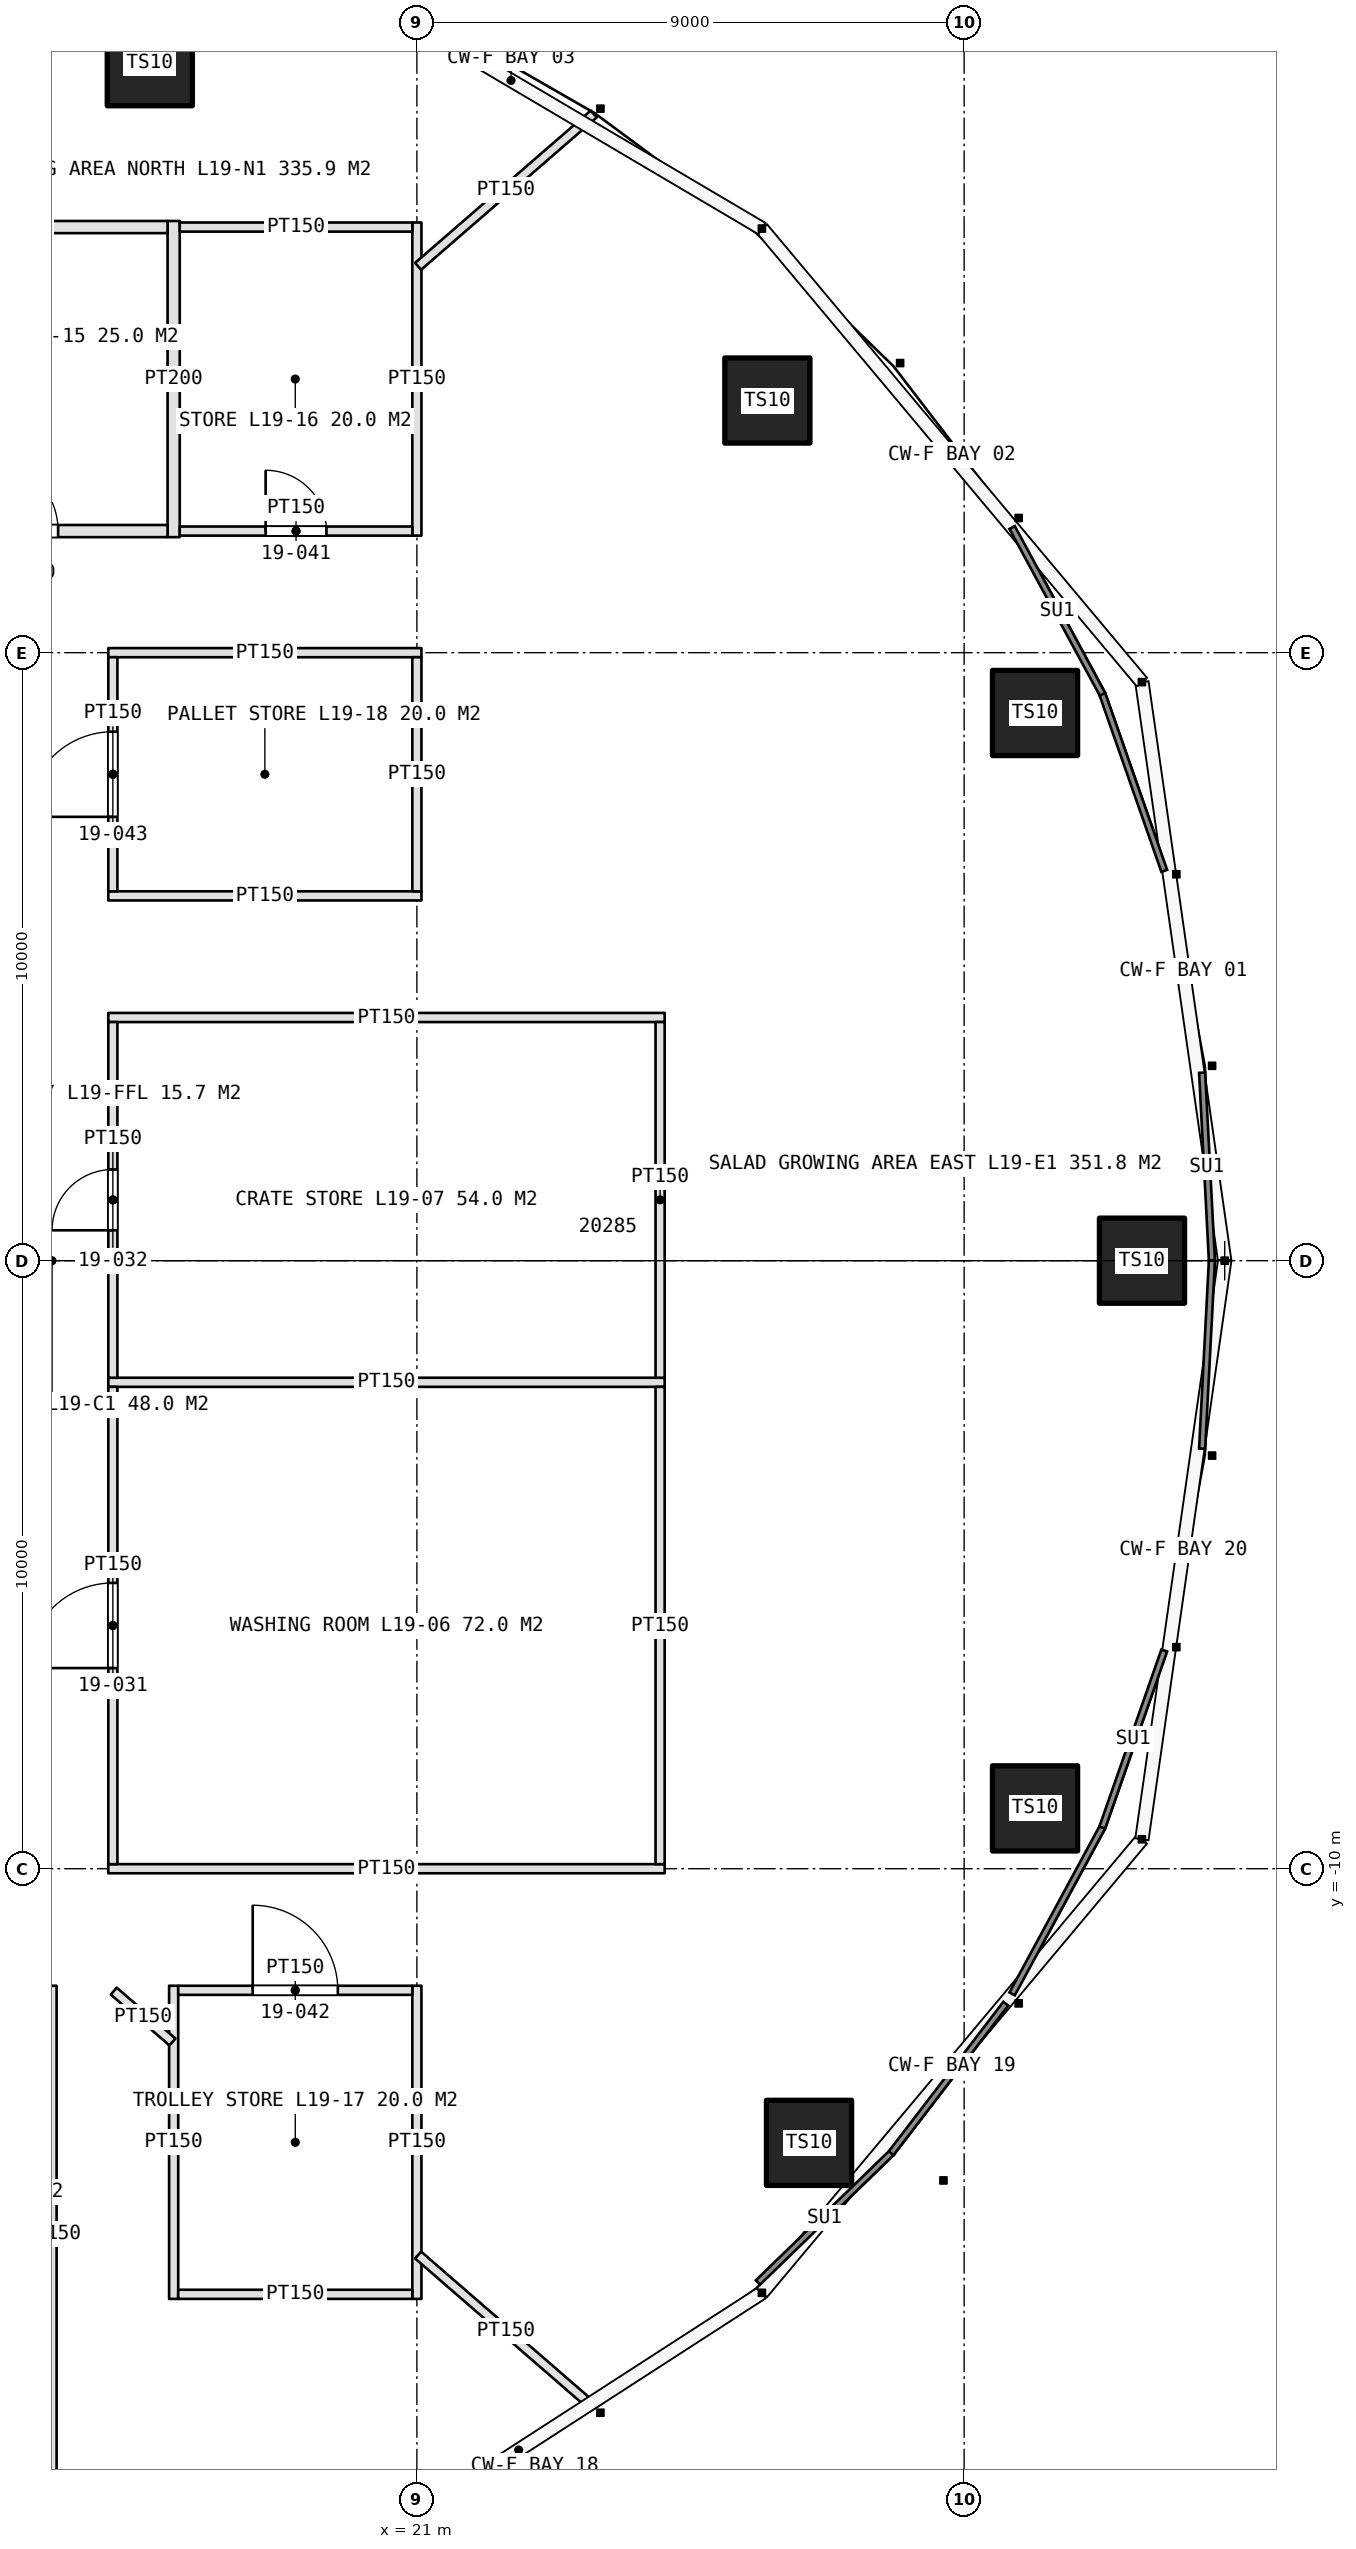
"""IFC4 building model, lengths in metres.
Left out: names, types, materials, properties, quantities, classifications, styles, units other than length and angle.
Written with IfcOpenShell. Run it as: python <this file> out.ifc"""

import sys

from ifc_helpers import new_model, si_unit, direction, frame, frame_2d, origin, origin_2d, place, context, subcontext, project, spatial, rectangle, hollow_rectangle, extrude, element, fill, save


model = new_model("IFC4")
c1 = context("Model", 3, precision=1e-05, world=origin(), true_north=direction((0.0, 1.0)))
c2 = subcontext(c1, "Body", "Model", "MODEL_VIEW")
j1 = project(units=[si_unit("LENGTHUNIT", "METRE"), si_unit("PLANEANGLEUNIT", "RADIAN")], contexts=[c1])
p1 = place(None, origin())
s1 = spatial("IfcSite", under=j1, at=p1, CompositionType="ELEMENT")
p2 = place(p1, origin())
s2 = spatial("IfcBuilding", under=s1, at=p2, CompositionType="ELEMENT")
p3 = place(p2, frame((0.0, 0.0, 95.0)))
s3 = spatial("IfcBuildingStorey", under=s2, at=p3, CompositionType="ELEMENT", Elevation=95.0)
for number, where, z_axis, x_axis in (
    (1, (32.925, 0.0, 0.0), (0.0, 0.0, 1.0), (1.0, 0.0, 0.0)),
    (2, (31.166, 9.008, 0.0), (0.0, 0.0, 1.0), (1.0, 0.0, 0.0)),
):
    element("IfcColumn", number, at=place(p3, frame(where, z_axis=z_axis, x_axis=x_axis)), inside=s3, PredefinedType="COLUMN", context=c2, shape_type="SweptSolid", body=[
        extrude(hollow_rectangle(XDim=1.4, YDim=1.4, WallThickness=0.15, at=origin_2d()), origin(), (0.0, 0.0, 1.0), 4.025),
    ])
for number, where, z_axis, x_axis in (
    (3, (26.764, 14.147, 0.0), (0.0, 0.0, 1.0), (1.0, 0.0, 0.0)),
    (4, (16.608, 19.695, 0.0), (0.0, 0.0, 1.0), (1.0, 0.0, 0.0)),
):
    element("IfcColumn", number, at=place(p3, frame(where, z_axis=z_axis, x_axis=x_axis)), inside=s3, PredefinedType="COLUMN", context=c2, shape_type="SweptSolid", body=[
        extrude(hollow_rectangle(XDim=1.4, YDim=1.4, WallThickness=0.15, at=origin_2d()), origin(), (0.0, 0.0, 1.0), 5.0),
    ])
for number, where, z_axis, x_axis in (
    (5, (27.449, -14.509, 0.0), (0.0, 0.0, 1.0), (1.0, 0.0, 0.0)),
    (6, (31.166, -9.008, 0.0), (0.0, 0.0, 1.0), (1.0, 0.0, 0.0)),
):
    element("IfcColumn", number, at=place(p3, frame(where, z_axis=z_axis, x_axis=x_axis)), inside=s3, PredefinedType="COLUMN", context=c2, shape_type="SweptSolid", body=[
        extrude(hollow_rectangle(XDim=1.4, YDim=1.4, WallThickness=0.15, at=origin_2d()), origin(), (0.0, 0.0, 1.0), 4.025),
    ])
p4 = place(p3, frame((15.0, -11.925, 0.0), z_axis=(0.0, 0.0, 1.0), x_axis=(0.0, -1.0, 0.0)))
e7 = element("IfcWall", 7, at=p4, inside=s3, PredefinedType="PARTITIONING", context=c2, shape_type="SweptSolid", body=[
    extrude(rectangle(XDim=8.15, YDim=0.15, at=frame_2d((4.075, 0.0))), origin(), (0.0, 0.0, 1.0), 3.6),
])
for number, where, z_axis, x_axis in (
    (8, (15.925, -10.0, 0.0), (0.0, 0.0, 1.0), (1.0, 0.0, 0.0)),
    (9, (15.925, -2.0, 0.0), (0.0, 0.0, 1.0), (1.0, 0.0, 0.0)),
    (10, (15.925, 4.0, 0.0), (0.0, 0.0, 1.0), (1.0, 0.0, 0.0)),
):
    element("IfcWall", number, at=place(p3, frame(where, z_axis=z_axis, x_axis=x_axis)), inside=s3, PredefinedType="PARTITIONING", context=c2, shape_type="SweptSolid", body=[
        extrude(rectangle(XDim=9.15, YDim=0.15, at=frame_2d((4.575, 0.0))), origin(), (0.0, 0.0, 1.0), 3.6),
    ])
p5 = place(p3, frame((16.0, -9.925, 0.0), z_axis=(0.0, 0.0, 1.0), x_axis=(0.0, 1.0, 0.0)))
e11 = element("IfcWall", 11, at=p5, inside=s3, PredefinedType="PARTITIONING", context=c2, shape_type="SweptSolid", body=[
    extrude(rectangle(XDim=7.85, YDim=0.15, at=frame_2d((3.925, 0.0))), origin(), (0.0, 0.0, 1.0), 3.6),
])
p6 = place(p5, frame((3.225, 0.0, 0.0)))
e12 = element("IfcOpeningElement", 12, at=p6, cuts=e11, PredefinedType="OPENING", context=c2, shape_type="SweptSolid", body=[
    extrude(rectangle(XDim=1.4, YDim=2.4, at=frame_2d((0.7, 1.2))), frame((0.0, 0.085, 0.0), z_axis=(0.0, -1.0, 0.0), x_axis=(1.0, 0.0, 0.0)), (0.0, 0.0, 1.0), 0.17),
])
p7 = place(p3, frame((25.0, -9.925, 0.0), z_axis=(0.0, 0.0, 1.0), x_axis=(0.0, 1.0, 0.0)))
e13 = element("IfcWall", 13, at=p7, inside=s3, PredefinedType="PARTITIONING", context=c2, shape_type="SweptSolid", body=[
    extrude(rectangle(XDim=7.85, YDim=0.15, at=frame_2d((3.925, 0.0))), origin(), (0.0, 0.0, 1.0), 3.6),
])
p8 = place(p3, frame((16.0, -1.925, 0.0), z_axis=(0.0, 0.0, 1.0), x_axis=(0.0, 1.0, 0.0)))
e14 = element("IfcWall", 14, at=p8, inside=s3, PredefinedType="PARTITIONING", context=c2, shape_type="SweptSolid", body=[
    extrude(rectangle(XDim=5.85, YDim=0.15, at=frame_2d((2.925, 0.0))), origin(), (0.0, 0.0, 1.0), 3.6),
])
p9 = place(p8, frame((2.425, 0.0, 0.0)))
e15 = element("IfcOpeningElement", 15, at=p9, cuts=e14, PredefinedType="OPENING", context=c2, shape_type="SweptSolid", body=[
    extrude(rectangle(XDim=1.0, YDim=2.2, at=frame_2d((0.5, 1.1))), frame((0.0, 0.085, 0.0), z_axis=(0.0, -1.0, 0.0), x_axis=(1.0, 0.0, 0.0)), (0.0, 0.0, 1.0), 0.17),
])
p10 = place(p3, frame((25.0, -1.925, 0.0), z_axis=(0.0, 0.0, 1.0), x_axis=(0.0, 1.0, 0.0)))
e16 = element("IfcWall", 16, at=p10, inside=s3, PredefinedType="PARTITIONING", context=c2, shape_type="SweptSolid", body=[
    extrude(rectangle(XDim=5.85, YDim=0.15, at=frame_2d((2.925, 0.0))), origin(), (0.0, 0.0, 1.0), 3.6),
])
p11 = place(p3, frame((17.0, 11.9, 0.0), z_axis=(0.0, 0.0, 1.0), x_axis=(0.0, 1.0, 0.0)))
e17 = element("IfcWall", 17, at=p11, inside=s3, PredefinedType="PARTITIONING", context=c2, shape_type="SweptSolid", body=[
    extrude(rectangle(XDim=5.2, YDim=0.2, at=frame_2d((2.6, 0.0))), origin(), (0.0, 0.0, 1.0), 3.6),
])
p12 = place(p3, frame((21.0, 11.925, 0.0), z_axis=(0.0, 0.0, 1.0), x_axis=(0.0, 1.0, 0.0)))
e18 = element("IfcWall", 18, at=p12, inside=s3, PredefinedType="PARTITIONING", context=c2, shape_type="SweptSolid", body=[
    extrude(rectangle(XDim=5.15, YDim=0.15, at=frame_2d((2.575, 0.0))), origin(), (0.0, 0.0, 1.0), 3.6),
])
p13 = place(p3, frame((12.1, 12.0, 0.0), z_axis=(0.0, 0.0, 1.0), x_axis=(1.0, 0.0, 0.0)))
e19 = element("IfcWall", 19, at=p13, inside=s3, PredefinedType="PARTITIONING", context=c2, shape_type="SweptSolid", body=[
    extrude(rectangle(XDim=4.8, YDim=0.2, at=frame_2d((2.4, 0.0))), origin(), (0.0, 0.0, 1.0), 3.6),
])
p14 = place(p13, frame((1.8, 0.0, 0.0)))
e20 = element("IfcOpeningElement", 20, at=p14, cuts=e19, PredefinedType="OPENING", context=c2, shape_type="SweptSolid", body=[
    extrude(rectangle(XDim=1.2, YDim=2.4, at=frame_2d((0.6, 1.2))), frame((0.0, 0.11, 0.0), z_axis=(0.0, -1.0, 0.0), x_axis=(1.0, 0.0, 0.0)), (0.0, 0.0, 1.0), 0.22),
])
p15 = place(p3, frame((12.1, 17.0, 0.0), z_axis=(0.0, 0.0, 1.0), x_axis=(1.0, 0.0, 0.0)))
e21 = element("IfcWall", 21, at=p15, inside=s3, PredefinedType="PARTITIONING", context=c2, shape_type="SweptSolid", body=[
    extrude(rectangle(XDim=4.8, YDim=0.2, at=frame_2d((2.4, 0.0))), origin(), (0.0, 0.0, 1.0), 3.6),
])
p16 = place(p3, frame((17.1, 12.0, 0.0), z_axis=(0.0, 0.0, 1.0), x_axis=(1.0, 0.0, 0.0)))
e22 = element("IfcWall", 22, at=p16, inside=s3, PredefinedType="PARTITIONING", context=c2, shape_type="SweptSolid", body=[
    extrude(rectangle(XDim=3.825, YDim=0.15, at=frame_2d((1.913, 0.0))), origin(), (0.0, 0.0, 1.0), 3.6),
])
p17 = place(p16, frame((1.413, 0.0, 0.0)))
e23 = element("IfcOpeningElement", 23, at=p17, cuts=e22, PredefinedType="OPENING", context=c2, shape_type="SweptSolid", body=[
    extrude(rectangle(XDim=1.0, YDim=2.2, at=frame_2d((0.5, 1.1))), frame((0.0, 0.085, 0.0), z_axis=(0.0, -1.0, 0.0), x_axis=(1.0, 0.0, 0.0)), (0.0, 0.0, 1.0), 0.17),
])
p18 = place(p3, frame((17.1, 17.0, 0.0), z_axis=(0.0, 0.0, 1.0), x_axis=(1.0, 0.0, 0.0)))
e24 = element("IfcWall", 24, at=p18, inside=s3, PredefinedType="PARTITIONING", context=c2, shape_type="SweptSolid", body=[
    extrude(rectangle(XDim=3.825, YDim=0.15, at=frame_2d((1.913, 0.0))), origin(), (0.0, 0.0, 1.0), 3.6),
])
for number, where, z_axis, x_axis in (
    (25, (17.0, -11.925, 0.0), (0.0, 0.0, 1.0), (0.0, -1.0, 0.0)),
    (26, (21.0, -11.925, 0.0), (0.0, 0.0, 1.0), (0.0, -1.0, 0.0)),
):
    element("IfcWall", number, at=place(p3, frame(where, z_axis=z_axis, x_axis=x_axis)), inside=s3, PredefinedType="PARTITIONING", context=c2, shape_type="SweptSolid", body=[
        extrude(rectangle(XDim=5.15, YDim=0.15, at=frame_2d((2.575, 0.0))), origin(), (0.0, 0.0, 1.0), 3.6),
    ])
p19 = place(p3, frame((17.075, -12.0, 0.0), z_axis=(0.0, 0.0, 1.0), x_axis=(1.0, 0.0, 0.0)))
e27 = element("IfcWall", 27, at=p19, inside=s3, PredefinedType="PARTITIONING", context=c2, shape_type="SweptSolid", body=[
    extrude(rectangle(XDim=3.85, YDim=0.15, at=frame_2d((1.925, 0.0))), origin(), (0.0, 0.0, 1.0), 3.6),
])
p20 = place(p19, frame((1.225, 0.0, 0.0)))
e28 = element("IfcOpeningElement", 28, at=p20, cuts=e27, PredefinedType="OPENING", context=c2, shape_type="SweptSolid", body=[
    extrude(rectangle(XDim=1.4, YDim=2.4, at=frame_2d((0.7, 1.2))), frame((0.0, 0.085, 0.0), z_axis=(0.0, -1.0, 0.0), x_axis=(1.0, 0.0, 0.0)), (0.0, 0.0, 1.0), 0.17),
])
p21 = place(p3, frame((17.075, -17.0, 0.0), z_axis=(0.0, 0.0, 1.0), x_axis=(1.0, 0.0, 0.0)))
e29 = element("IfcWall", 29, at=p21, inside=s3, PredefinedType="PARTITIONING", context=c2, shape_type="SweptSolid", body=[
    extrude(rectangle(XDim=3.85, YDim=0.15, at=frame_2d((1.925, 0.0))), origin(), (0.0, 0.0, 1.0), 3.6),
])
for number, where, z_axis, x_axis in (
    (30, (15.925, 6.0, 0.0), (0.0, 0.0, 1.0), (1.0, 0.0, 0.0)),
    (31, (15.925, 10.0, 0.0), (0.0, 0.0, 1.0), (1.0, 0.0, 0.0)),
):
    element("IfcWall", number, at=place(p3, frame(where, z_axis=z_axis, x_axis=x_axis)), inside=s3, PredefinedType="PARTITIONING", context=c2, shape_type="SweptSolid", body=[
        extrude(rectangle(XDim=5.15, YDim=0.15, at=frame_2d((2.575, 0.0))), origin(), (0.0, 0.0, 1.0), 3.6),
    ])
p22 = place(p3, frame((16.0, 6.075, 0.0), z_axis=(0.0, 0.0, 1.0), x_axis=(0.0, 1.0, 0.0)))
e32 = element("IfcWall", 32, at=p22, inside=s3, PredefinedType="PARTITIONING", context=c2, shape_type="SweptSolid", body=[
    extrude(rectangle(XDim=3.85, YDim=0.15, at=frame_2d((1.925, 0.0))), origin(), (0.0, 0.0, 1.0), 3.6),
])
p23 = place(p22, frame((1.225, 0.0, 0.0)))
e33 = element("IfcOpeningElement", 33, at=p23, cuts=e32, PredefinedType="OPENING", context=c2, shape_type="SweptSolid", body=[
    extrude(rectangle(XDim=1.4, YDim=2.4, at=frame_2d((0.7, 1.2))), frame((0.0, 0.085, 0.0), z_axis=(0.0, -1.0, 0.0), x_axis=(1.0, 0.0, 0.0)), (0.0, 0.0, 1.0), 0.17),
])
p24 = place(p3, frame((21.0, 6.075, 0.0), z_axis=(0.0, 0.0, 1.0), x_axis=(0.0, 1.0, 0.0)))
e34 = element("IfcWall", 34, at=p24, inside=s3, PredefinedType="PARTITIONING", context=c2, shape_type="SweptSolid", body=[
    extrude(rectangle(XDim=3.85, YDim=0.15, at=frame_2d((1.925, 0.0))), origin(), (0.0, 0.0, 1.0), 3.6),
])
p25 = place(p3, frame((21.02, -16.354, 0.0), z_axis=(0.0, 0.0, 1.0), x_axis=(0.755425653008, -0.655234372402, 0.0)))
e35 = element("IfcWall", 35, at=p25, inside=s3, PredefinedType="PARTITIONING", context=c2, shape_type="SweptSolid", body=[
    extrude(rectangle(XDim=3.823, YDim=0.15, at=frame_2d((1.912, 0.0))), origin(), (0.0, 0.0, 1.0), 3.6),
])
p26 = place(p3, frame((16.015, -12.013, 0.0), z_axis=(0.0, 0.0, 1.0), x_axis=(0.755411512729, -0.655250674503, 0.0)))
e36 = element("IfcWall", 36, at=p26, inside=s3, PredefinedType="PARTITIONING", context=c2, shape_type="SweptSolid", body=[
    extrude(rectangle(XDim=1.277, YDim=0.15, at=frame_2d((0.639, 0.0))), origin(), (0.0, 0.0, 1.0), 3.6),
])
p27 = place(p3, frame((21.02, 16.354, 0.0), z_axis=(0.0, 0.0, 1.0), x_axis=(0.755425653008, 0.655234372402, 0.0)))
e37 = element("IfcWall", 37, at=p27, inside=s3, PredefinedType="PARTITIONING", context=c2, shape_type="SweptSolid", body=[
    extrude(rectangle(XDim=3.823, YDim=0.15, at=frame_2d((1.912, 0.0))), origin(), (0.0, 0.0, 1.0), 3.6),
])
p28 = place(p6, origin())
e38 = element("IfcDoor", 38, at=p28, inside=s3, OperationType="DOUBLE_DOOR_DOUBLE_SWING", PredefinedType="DOOR", context=c2, shape_type="SweptSolid", body=[
    extrude(rectangle(XDim=1.4, YDim=2.4, at=frame_2d((0.7, 1.2))), frame((0.0, 0.025, 0.0), z_axis=(0.0, -1.0, 0.0), x_axis=(1.0, 0.0, 0.0)), (0.0, 0.0, 1.0), 0.05),
])
fill(e12, e38)
p29 = place(p9, origin())
e39 = element("IfcDoor", 39, at=p29, inside=s3, OperationType="SINGLE_SWING_LEFT", PredefinedType="DOOR", context=c2, shape_type="SweptSolid", body=[
    extrude(rectangle(XDim=1.0, YDim=2.2, at=frame_2d((0.5, 1.1))), frame((0.0, 0.025, 0.0), z_axis=(0.0, -1.0, 0.0), x_axis=(1.0, 0.0, 0.0)), (0.0, 0.0, 1.0), 0.05),
])
fill(e15, e39)
p30 = place(p14, origin())
e40 = element("IfcDoor", 40, at=p30, inside=s3, OperationType="SINGLE_SWING_LEFT", PredefinedType="DOOR", context=c2, shape_type="SweptSolid", body=[
    extrude(rectangle(XDim=1.2, YDim=2.4, at=frame_2d((0.6, 1.2))), frame((0.0, 0.025, 0.0), z_axis=(0.0, -1.0, 0.0), x_axis=(1.0, 0.0, 0.0)), (0.0, 0.0, 1.0), 0.05),
])
fill(e20, e40)
p31 = place(p17, origin())
e41 = element("IfcDoor", 41, at=p31, inside=s3, OperationType="SINGLE_SWING_LEFT", PredefinedType="DOOR", context=c2, shape_type="SweptSolid", body=[
    extrude(rectangle(XDim=1.0, YDim=2.2, at=frame_2d((0.5, 1.1))), frame((0.0, 0.025, 0.0), z_axis=(0.0, -1.0, 0.0), x_axis=(1.0, 0.0, 0.0)), (0.0, 0.0, 1.0), 0.05),
])
fill(e23, e41)
p32 = place(p20, origin())
e42 = element("IfcDoor", 42, at=p32, inside=s3, OperationType="DOUBLE_DOOR_DOUBLE_SWING", PredefinedType="DOOR", context=c2, shape_type="SweptSolid", body=[
    extrude(rectangle(XDim=1.4, YDim=2.4, at=frame_2d((0.7, 1.2))), frame((0.0, 0.025, 0.0), z_axis=(0.0, -1.0, 0.0), x_axis=(1.0, 0.0, 0.0)), (0.0, 0.0, 1.0), 0.05),
])
fill(e28, e42)
p33 = place(p23, origin())
e43 = element("IfcDoor", 43, at=p33, inside=s3, OperationType="DOUBLE_DOOR_DOUBLE_SWING", PredefinedType="DOOR", context=c2, shape_type="SweptSolid", body=[
    extrude(rectangle(XDim=1.4, YDim=2.4, at=frame_2d((0.7, 1.2))), frame((0.0, 0.025, 0.0), z_axis=(0.0, -1.0, 0.0), x_axis=(1.0, 0.0, 0.0)), (0.0, 0.0, 1.0), 0.05),
])
fill(e33, e43)
save(model, sys.argv[1])
